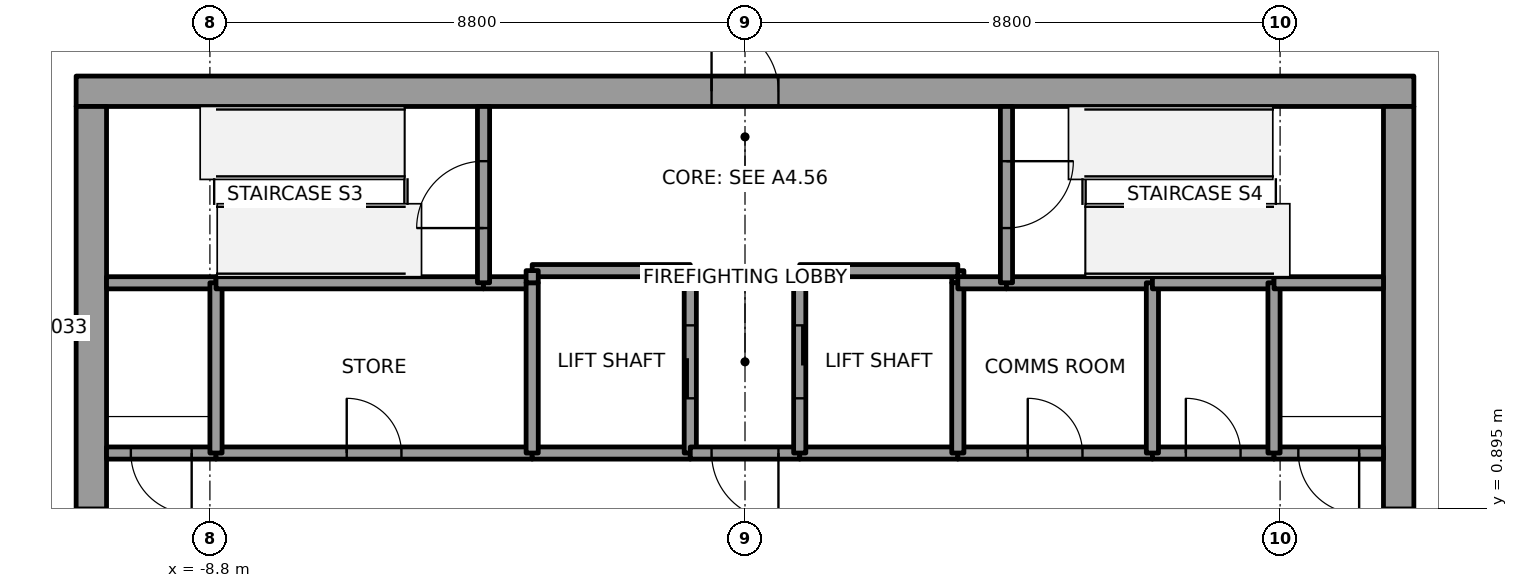
"""IFC4 building model, lengths in metres.
Left out: names, types, materials, properties, quantities, classifications, styles, units other than length and angle.
Written with IfcOpenShell. Run it as: python <this file> out.ifc"""

import sys

from ifc_helpers import new_model, si_unit, direction, frame, frame_2d, origin, place, context, subcontext, project, spatial, rectangle, extrude, element, fill, save


model = new_model("IFC4")
c1 = context("Model", 3, precision=1e-05, world=origin(), true_north=direction((0.0, 1.0)))
c2 = subcontext(c1, "Body", "Model", "MODEL_VIEW")
j1 = project(units=[si_unit("LENGTHUNIT", "METRE"), si_unit("PLANEANGLEUNIT", "RADIAN")], contexts=[c1])
p1 = place(None, origin())
s1 = spatial("IfcSite", under=j1, at=p1, CompositionType="ELEMENT")
p2 = place(p1, origin())
s2 = spatial("IfcBuilding", under=s1, at=p2, CompositionType="ELEMENT")
p3 = place(p2, frame((0.0, 0.0, 243.0)))
s3 = spatial("IfcBuildingStorey", under=s2, at=p3, CompositionType="ELEMENT", Elevation=243.0)
p4 = place(p3, frame((-11.0, 7.75, 0.0), z_axis=(0.0, 0.0, 1.0), x_axis=(1.0, 0.0, 0.0)))
e1 = element("IfcWall", 1, at=p4, inside=s3, PredefinedType="SHEAR", context=c2, shape_type="SweptSolid", body=[
    extrude(rectangle(XDim=22.0, YDim=0.5, at=frame_2d((11.0, 0.0))), origin(), (0.0, 0.0, 1.0), 4.0),
])
p5 = place(p4, frame((10.45, 0.0, 0.0)))
e2 = element("IfcOpeningElement", 2, at=p5, cuts=e1, PredefinedType="OPENING", context=c2, shape_type="SweptSolid", body=[
    extrude(rectangle(XDim=1.1, YDim=2.1, at=frame_2d((0.55, 1.05))), frame((0.0, 0.25, 0.0), z_axis=(0.0, -1.0, 0.0), x_axis=(1.0, 0.0, 0.0)), (0.0, 0.0, 1.0), 0.5),
])
p6 = place(p3, frame((-10.75, -7.5, 0.0), z_axis=(0.0, 0.0, 1.0), x_axis=(0.0, 1.0, 0.0)))
e3 = element("IfcWall", 3, at=p6, inside=s3, PredefinedType="SHEAR", context=c2, shape_type="SweptSolid", body=[
    extrude(rectangle(XDim=15.0, YDim=0.5, at=frame_2d((7.5, 0.0))), origin(), (0.0, 0.0, 1.0), 4.0),
])
p7 = place(p6, frame((6.6, 0.0, 0.0)))
e4 = element("IfcOpeningElement", 4, at=p7, cuts=e3, PredefinedType="OPENING", context=c2, shape_type="SweptSolid", body=[
    extrude(rectangle(XDim=1.8, YDim=2.1, at=frame_2d((0.9, 1.05))), frame((0.0, 0.25, 0.0), z_axis=(0.0, -1.0, 0.0), x_axis=(1.0, 0.0, 0.0)), (0.0, 0.0, 1.0), 0.5),
])
p8 = place(p3, frame((10.75, -7.5, 0.0), z_axis=(0.0, 0.0, 1.0), x_axis=(0.0, 1.0, 0.0)))
e5 = element("IfcWall", 5, at=p8, inside=s3, PredefinedType="SHEAR", context=c2, shape_type="SweptSolid", body=[
    extrude(rectangle(XDim=15.0, YDim=0.5, at=frame_2d((7.5, 0.0))), origin(), (0.0, 0.0, 1.0), 4.0),
])
p9 = place(p8, frame((6.6, 0.0, 0.0)))
e6 = element("IfcOpeningElement", 6, at=p9, cuts=e5, PredefinedType="OPENING", context=c2, shape_type="SweptSolid", body=[
    extrude(rectangle(XDim=1.8, YDim=2.1, at=frame_2d((0.9, 1.05))), frame((0.0, 0.25, 0.0), z_axis=(0.0, -1.0, 0.0), x_axis=(1.0, 0.0, 0.0)), (0.0, 0.0, 1.0), 0.5),
])
p10 = place(p3, frame((-8.7, 1.8, 0.0), z_axis=(0.0, 0.0, 1.0), x_axis=(-1.0, 0.0, 0.0)))
e7 = element("IfcWall", 7, at=p10, inside=s3, PredefinedType="SOLIDWALL", context=c2, shape_type="SweptSolid", body=[
    extrude(rectangle(XDim=1.8, YDim=0.2, at=frame_2d((0.9, 0.0))), origin(), (0.0, 0.0, 1.0), 3.85),
])
p11 = place(p10, frame((0.4, 0.0, 0.0)))
e8 = element("IfcOpeningElement", 8, at=p11, cuts=e7, PredefinedType="OPENING", context=c2, shape_type="SweptSolid", body=[
    extrude(rectangle(XDim=1.0, YDim=2.1, at=frame_2d((0.5, 1.05))), frame((0.0, 0.1, 0.0), z_axis=(0.0, -1.0, 0.0), x_axis=(1.0, 0.0, 0.0)), (0.0, 0.0, 1.0), 0.2),
])
p12 = place(p3, frame((-8.7, 4.6, 0.0), z_axis=(0.0, 0.0, 1.0), x_axis=(-1.0, 0.0, 0.0)))
e9 = element("IfcWall", 9, at=p12, inside=s3, PredefinedType="SOLIDWALL", context=c2, shape_type="SweptSolid", body=[
    extrude(rectangle(XDim=1.8, YDim=0.2, at=frame_2d((0.9, 0.0))), origin(), (0.0, 0.0, 1.0), 3.85),
])
p13 = place(p3, frame((-8.7, 1.8, 0.0), z_axis=(0.0, 0.0, 1.0), x_axis=(1.0, 0.0, 0.0)))
e10 = element("IfcWall", 10, at=p13, inside=s3, PredefinedType="SOLIDWALL", context=c2, shape_type="SweptSolid", body=[
    extrude(rectangle(XDim=5.2, YDim=0.2, at=frame_2d((2.6, 0.0))), origin(), (0.0, 0.0, 1.0), 3.85),
])
p14 = place(p13, frame((2.15, 0.0, 0.0)))
e11 = element("IfcOpeningElement", 11, at=p14, cuts=e10, PredefinedType="OPENING", context=c2, shape_type="SweptSolid", body=[
    extrude(rectangle(XDim=0.9, YDim=2.1, at=frame_2d((0.45, 1.05))), frame((0.0, 0.1, 0.0), z_axis=(0.0, -1.0, 0.0), x_axis=(1.0, 0.0, 0.0)), (0.0, 0.0, 1.0), 0.2),
])
p15 = place(p3, frame((-8.7, 4.6, 0.0), z_axis=(0.0, 0.0, 1.0), x_axis=(0.0, -1.0, 0.0)))
e12 = element("IfcWall", 12, at=p15, inside=s3, PredefinedType="SOLIDWALL", context=c2, shape_type="SweptSolid", body=[
    extrude(rectangle(XDim=2.8, YDim=0.2, at=frame_2d((1.4, 0.0))), origin(), (0.0, 0.0, 1.0), 3.85),
])
p16 = place(p3, frame((-4.3, 4.6, 0.0), z_axis=(0.0, 0.0, 1.0), x_axis=(-1.0, 0.0, 0.0)))
e13 = element("IfcWall", 13, at=p16, inside=s3, PredefinedType="SOLIDWALL", context=c2, shape_type="SweptSolid", body=[
    extrude(rectangle(XDim=4.4, YDim=0.2, at=frame_2d((2.2, 0.0))), origin(), (0.0, 0.0, 1.0), 3.85),
])
p17 = place(p3, frame((-3.5, 4.6, 0.0), z_axis=(0.0, 0.0, 1.0), x_axis=(-1.0, 0.0, 0.0)))
e14 = element("IfcWall", 14, at=p17, inside=s3, PredefinedType="SOLIDWALL", context=c2, shape_type="SweptSolid", body=[
    extrude(rectangle(XDim=0.8, YDim=0.2, at=frame_2d((0.4, 0.0))), origin(), (0.0, 0.0, 1.0), 3.85),
])
p18 = place(p3, frame((-4.3, 4.6, 0.0), z_axis=(0.0, 0.0, 1.0), x_axis=(0.0, 1.0, 0.0)))
e15 = element("IfcWall", 15, at=p18, inside=s3, PredefinedType="SOLIDWALL", context=c2, shape_type="SweptSolid", body=[
    extrude(rectangle(XDim=2.9, YDim=0.2, at=frame_2d((1.45, 0.0))), origin(), (0.0, 0.0, 1.0), 3.85),
])
p19 = place(p18, frame((0.9, 0.0, 0.0)))
e16 = element("IfcOpeningElement", 16, at=p19, cuts=e15, PredefinedType="OPENING", context=c2, shape_type="SweptSolid", body=[
    extrude(rectangle(XDim=1.1, YDim=2.1, at=frame_2d((0.55, 1.05))), frame((0.0, 0.1, 0.0), z_axis=(0.0, -1.0, 0.0), x_axis=(1.0, 0.0, 0.0)), (0.0, 0.0, 1.0), 0.2),
])
p20 = place(p3, frame((-0.9, 1.8, 0.0), z_axis=(0.0, 0.0, 1.0), x_axis=(-1.0, 0.0, 0.0)))
e17 = element("IfcWall", 17, at=p20, inside=s3, PredefinedType="SOLIDWALL", context=c2, shape_type="SweptSolid", body=[
    extrude(rectangle(XDim=2.6, YDim=0.2, at=frame_2d((1.3, 0.0))), origin(), (0.0, 0.0, 1.0), 3.85),
])
p21 = place(p3, frame((-3.5, 1.8, 0.0), z_axis=(0.0, 0.0, 1.0), x_axis=(0.0, 1.0, 0.0)))
e18 = element("IfcWall", 18, at=p21, inside=s3, PredefinedType="SOLIDWALL", context=c2, shape_type="SweptSolid", body=[
    extrude(rectangle(XDim=2.8, YDim=0.2, at=frame_2d((1.4, 0.0))), origin(), (0.0, 0.0, 1.0), 3.85),
])
p22 = place(p3, frame((-0.9, 1.8, 0.0), z_axis=(0.0, 0.0, 1.0), x_axis=(0.0, 1.0, 0.0)))
e19 = element("IfcWall", 19, at=p22, inside=s3, PredefinedType="SOLIDWALL", context=c2, shape_type="SweptSolid", body=[
    extrude(rectangle(XDim=3.0, YDim=0.2, at=frame_2d((1.5, 0.0))), origin(), (0.0, 0.0, 1.0), 3.85),
])
p23 = place(p22, frame((0.9, 0.0, 0.0)))
e20 = element("IfcOpeningElement", 20, at=p23, cuts=e19, PredefinedType="OPENING", context=c2, shape_type="SweptSolid", body=[
    extrude(rectangle(XDim=1.2, YDim=2.1, at=frame_2d((0.6, 1.05))), frame((0.0, 0.1, 0.0), z_axis=(0.0, -1.0, 0.0), x_axis=(1.0, 0.0, 0.0)), (0.0, 0.0, 1.0), 0.2),
])
p24 = place(p3, frame((-0.9, 4.8, 0.0), z_axis=(0.0, 0.0, 1.0), x_axis=(-1.0, 0.0, 0.0)))
e21 = element("IfcWall", 21, at=p24, inside=s3, PredefinedType="SOLIDWALL", context=c2, shape_type="SweptSolid", body=[
    extrude(rectangle(XDim=2.6, YDim=0.2, at=frame_2d((1.3, 0.0))), origin(), (0.0, 0.0, 1.0), 3.85),
])
p25 = place(p3, frame((-3.5, 4.8, 0.0), z_axis=(0.0, 0.0, 1.0), x_axis=(0.0, -1.0, 0.0)))
e22 = element("IfcWall", 22, at=p25, inside=s3, PredefinedType="SOLIDWALL", context=c2, shape_type="SweptSolid", body=[
    extrude(rectangle(XDim=0.2, YDim=0.2, at=frame_2d((0.1, 0.0))), origin(), (0.0, 0.0, 1.0), 3.85),
])
p26 = place(p3, frame((0.9, 1.8, 0.0), z_axis=(0.0, 0.0, 1.0), x_axis=(-1.0, 0.0, 0.0)))
e23 = element("IfcWall", 23, at=p26, inside=s3, PredefinedType="SOLIDWALL", context=c2, shape_type="SweptSolid", body=[
    extrude(rectangle(XDim=1.8, YDim=0.2, at=frame_2d((0.9, 0.0))), origin(), (0.0, 0.0, 1.0), 3.85),
])
p27 = place(p26, frame((0.35, 0.0, 0.0)))
e24 = element("IfcOpeningElement", 24, at=p27, cuts=e23, PredefinedType="OPENING", context=c2, shape_type="SweptSolid", body=[
    extrude(rectangle(XDim=1.1, YDim=2.1, at=frame_2d((0.55, 1.05))), frame((0.0, 0.1, 0.0), z_axis=(0.0, -1.0, 0.0), x_axis=(1.0, 0.0, 0.0)), (0.0, 0.0, 1.0), 0.2),
])
p28 = place(p3, frame((3.5, 1.8, 0.0), z_axis=(0.0, 0.0, 1.0), x_axis=(-1.0, 0.0, 0.0)))
e25 = element("IfcWall", 25, at=p28, inside=s3, PredefinedType="SOLIDWALL", context=c2, shape_type="SweptSolid", body=[
    extrude(rectangle(XDim=2.6, YDim=0.2, at=frame_2d((1.3, 0.0))), origin(), (0.0, 0.0, 1.0), 3.85),
])
p29 = place(p3, frame((3.5, 4.6, 0.0), z_axis=(0.0, 0.0, 1.0), x_axis=(0.0, 1.0, 0.0)))
e26 = element("IfcWall", 26, at=p29, inside=s3, PredefinedType="SOLIDWALL", context=c2, shape_type="SweptSolid", body=[
    extrude(rectangle(XDim=0.2, YDim=0.2, at=frame_2d((0.1, 0.0))), origin(), (0.0, 0.0, 1.0), 3.85),
])
p30 = place(p3, frame((3.5, 4.8, 0.0), z_axis=(0.0, 0.0, 1.0), x_axis=(-1.0, 0.0, 0.0)))
e27 = element("IfcWall", 27, at=p30, inside=s3, PredefinedType="SOLIDWALL", context=c2, shape_type="SweptSolid", body=[
    extrude(rectangle(XDim=2.6, YDim=0.2, at=frame_2d((1.3, 0.0))), origin(), (0.0, 0.0, 1.0), 3.85),
])
p31 = place(p3, frame((0.9, 4.8, 0.0), z_axis=(0.0, 0.0, 1.0), x_axis=(0.0, -1.0, 0.0)))
e28 = element("IfcWall", 28, at=p31, inside=s3, PredefinedType="SOLIDWALL", context=c2, shape_type="SweptSolid", body=[
    extrude(rectangle(XDim=3.0, YDim=0.2, at=frame_2d((1.5, 0.0))), origin(), (0.0, 0.0, 1.0), 3.85),
])
p32 = place(p31, frame((0.9, 0.0, 0.0)))
e29 = element("IfcOpeningElement", 29, at=p32, cuts=e28, PredefinedType="OPENING", context=c2, shape_type="SweptSolid", body=[
    extrude(rectangle(XDim=1.2, YDim=2.1, at=frame_2d((0.6, 1.05))), frame((0.0, 0.1, 0.0), z_axis=(0.0, -1.0, 0.0), x_axis=(1.0, 0.0, 0.0)), (0.0, 0.0, 1.0), 0.2),
])
p33 = place(p3, frame((3.5, 1.8, 0.0), z_axis=(0.0, 0.0, 1.0), x_axis=(1.0, 0.0, 0.0)))
e30 = element("IfcWall", 30, at=p33, inside=s3, PredefinedType="SOLIDWALL", context=c2, shape_type="SweptSolid", body=[
    extrude(rectangle(XDim=3.2, YDim=0.2, at=frame_2d((1.6, 0.0))), origin(), (0.0, 0.0, 1.0), 3.85),
])
p34 = place(p33, frame((1.15, 0.0, 0.0)))
e31 = element("IfcOpeningElement", 31, at=p34, cuts=e30, PredefinedType="OPENING", context=c2, shape_type="SweptSolid", body=[
    extrude(rectangle(XDim=0.9, YDim=2.1, at=frame_2d((0.45, 1.05))), frame((0.0, 0.1, 0.0), z_axis=(0.0, -1.0, 0.0), x_axis=(1.0, 0.0, 0.0)), (0.0, 0.0, 1.0), 0.2),
])
p35 = place(p3, frame((3.5, 4.6, 0.0), z_axis=(0.0, 0.0, 1.0), x_axis=(0.0, -1.0, 0.0)))
e32 = element("IfcWall", 32, at=p35, inside=s3, PredefinedType="SOLIDWALL", context=c2, shape_type="SweptSolid", body=[
    extrude(rectangle(XDim=2.8, YDim=0.2, at=frame_2d((1.4, 0.0))), origin(), (0.0, 0.0, 1.0), 3.85),
])
p36 = place(p3, frame((4.3, 4.6, 0.0), z_axis=(0.0, 0.0, 1.0), x_axis=(-1.0, 0.0, 0.0)))
e33 = element("IfcWall", 33, at=p36, inside=s3, PredefinedType="SOLIDWALL", context=c2, shape_type="SweptSolid", body=[
    extrude(rectangle(XDim=0.8, YDim=0.2, at=frame_2d((0.4, 0.0))), origin(), (0.0, 0.0, 1.0), 3.85),
])
p37 = place(p3, frame((6.7, 4.6, 0.0), z_axis=(0.0, 0.0, 1.0), x_axis=(-1.0, 0.0, 0.0)))
e34 = element("IfcWall", 34, at=p37, inside=s3, PredefinedType="SOLIDWALL", context=c2, shape_type="SweptSolid", body=[
    extrude(rectangle(XDim=2.4, YDim=0.2, at=frame_2d((1.2, 0.0))), origin(), (0.0, 0.0, 1.0), 3.85),
])
p38 = place(p3, frame((4.3, 7.5, 0.0), z_axis=(0.0, 0.0, 1.0), x_axis=(0.0, -1.0, 0.0)))
e35 = element("IfcWall", 35, at=p38, inside=s3, PredefinedType="SOLIDWALL", context=c2, shape_type="SweptSolid", body=[
    extrude(rectangle(XDim=2.9, YDim=0.2, at=frame_2d((1.45, 0.0))), origin(), (0.0, 0.0, 1.0), 3.85),
])
p39 = place(p38, frame((0.9, 0.0, 0.0)))
e36 = element("IfcOpeningElement", 36, at=p39, cuts=e35, PredefinedType="OPENING", context=c2, shape_type="SweptSolid", body=[
    extrude(rectangle(XDim=1.1, YDim=2.1, at=frame_2d((0.55, 1.05))), frame((0.0, 0.1, 0.0), z_axis=(0.0, -1.0, 0.0), x_axis=(1.0, 0.0, 0.0)), (0.0, 0.0, 1.0), 0.2),
])
p40 = place(p3, frame((6.7, 1.8, 0.0), z_axis=(0.0, 0.0, 1.0), x_axis=(1.0, 0.0, 0.0)))
e37 = element("IfcWall", 37, at=p40, inside=s3, PredefinedType="SOLIDWALL", context=c2, shape_type="SweptSolid", body=[
    extrude(rectangle(XDim=2.0, YDim=0.2, at=frame_2d((1.0, 0.0))), origin(), (0.0, 0.0, 1.0), 3.85),
])
p41 = place(p40, frame((0.55, 0.0, 0.0)))
e38 = element("IfcOpeningElement", 38, at=p41, cuts=e37, PredefinedType="OPENING", context=c2, shape_type="SweptSolid", body=[
    extrude(rectangle(XDim=0.9, YDim=2.1, at=frame_2d((0.45, 1.05))), frame((0.0, 0.1, 0.0), z_axis=(0.0, -1.0, 0.0), x_axis=(1.0, 0.0, 0.0)), (0.0, 0.0, 1.0), 0.2),
])
p42 = place(p3, frame((6.7, 1.8, 0.0), z_axis=(0.0, 0.0, 1.0), x_axis=(0.0, 1.0, 0.0)))
e39 = element("IfcWall", 39, at=p42, inside=s3, PredefinedType="SOLIDWALL", context=c2, shape_type="SweptSolid", body=[
    extrude(rectangle(XDim=2.8, YDim=0.2, at=frame_2d((1.4, 0.0))), origin(), (0.0, 0.0, 1.0), 3.85),
])
p43 = place(p3, frame((8.7, 4.6, 0.0), z_axis=(0.0, 0.0, 1.0), x_axis=(-1.0, 0.0, 0.0)))
e40 = element("IfcWall", 40, at=p43, inside=s3, PredefinedType="SOLIDWALL", context=c2, shape_type="SweptSolid", body=[
    extrude(rectangle(XDim=2.0, YDim=0.2, at=frame_2d((1.0, 0.0))), origin(), (0.0, 0.0, 1.0), 3.85),
])
p44 = place(p3, frame((10.5, 1.8, 0.0), z_axis=(0.0, 0.0, 1.0), x_axis=(-1.0, 0.0, 0.0)))
e41 = element("IfcWall", 41, at=p44, inside=s3, PredefinedType="SOLIDWALL", context=c2, shape_type="SweptSolid", body=[
    extrude(rectangle(XDim=1.8, YDim=0.2, at=frame_2d((0.9, 0.0))), origin(), (0.0, 0.0, 1.0), 3.85),
])
p45 = place(p44, frame((0.4, 0.0, 0.0)))
e42 = element("IfcOpeningElement", 42, at=p45, cuts=e41, PredefinedType="OPENING", context=c2, shape_type="SweptSolid", body=[
    extrude(rectangle(XDim=1.0, YDim=2.1, at=frame_2d((0.5, 1.05))), frame((0.0, 0.1, 0.0), z_axis=(0.0, -1.0, 0.0), x_axis=(1.0, 0.0, 0.0)), (0.0, 0.0, 1.0), 0.2),
])
p46 = place(p3, frame((8.7, 1.8, 0.0), z_axis=(0.0, 0.0, 1.0), x_axis=(0.0, 1.0, 0.0)))
e43 = element("IfcWall", 43, at=p46, inside=s3, PredefinedType="SOLIDWALL", context=c2, shape_type="SweptSolid", body=[
    extrude(rectangle(XDim=2.8, YDim=0.2, at=frame_2d((1.4, 0.0))), origin(), (0.0, 0.0, 1.0), 3.85),
])
p47 = place(p3, frame((10.5, 4.6, 0.0), z_axis=(0.0, 0.0, 1.0), x_axis=(-1.0, 0.0, 0.0)))
e44 = element("IfcWall", 44, at=p47, inside=s3, PredefinedType="SOLIDWALL", context=c2, shape_type="SweptSolid", body=[
    extrude(rectangle(XDim=1.8, YDim=0.2, at=frame_2d((0.9, 0.0))), origin(), (0.0, 0.0, 1.0), 3.85),
])
p48 = place(p23, origin())
e45 = element("IfcDoor", 45, at=p48, inside=s3, OperationType="SLIDING_TO_LEFT", PredefinedType="DOOR", context=c2, shape_type="SweptSolid", body=[
    extrude(rectangle(XDim=1.2, YDim=2.1, at=frame_2d((0.6, 1.05))), frame((0.0, 0.025, 0.0), z_axis=(0.0, -1.0, 0.0), x_axis=(1.0, 0.0, 0.0)), (0.0, 0.0, 1.0), 0.05),
])
fill(e20, e45)
p49 = place(p32, origin())
e46 = element("IfcDoor", 46, at=p49, inside=s3, OperationType="SLIDING_TO_RIGHT", PredefinedType="DOOR", context=c2, shape_type="SweptSolid", body=[
    extrude(rectangle(XDim=1.2, YDim=2.1, at=frame_2d((0.6, 1.05))), frame((0.0, 0.025, 0.0), z_axis=(0.0, -1.0, 0.0), x_axis=(1.0, 0.0, 0.0)), (0.0, 0.0, 1.0), 0.05),
])
fill(e29, e46)
p50 = place(p27, origin())
e47 = element("IfcDoor", 47, at=p50, inside=s3, OperationType="SINGLE_SWING_RIGHT", PredefinedType="DOOR", context=c2, shape_type="SweptSolid", body=[
    extrude(rectangle(XDim=1.1, YDim=2.1, at=frame_2d((0.55, 1.05))), frame((0.0, 0.025, 0.0), z_axis=(0.0, -1.0, 0.0), x_axis=(1.0, 0.0, 0.0)), (0.0, 0.0, 1.0), 0.05),
])
fill(e24, e47)
p51 = place(p11, origin())
e48 = element("IfcDoor", 48, at=p51, inside=s3, OperationType="SINGLE_SWING_LEFT", PredefinedType="DOOR", context=c2, shape_type="SweptSolid", body=[
    extrude(rectangle(XDim=1.0, YDim=2.1, at=frame_2d((0.5, 1.05))), frame((0.0, 0.025, 0.0), z_axis=(0.0, -1.0, 0.0), x_axis=(1.0, 0.0, 0.0)), (0.0, 0.0, 1.0), 0.05),
])
fill(e8, e48)
p52 = place(p45, origin())
e49 = element("IfcDoor", 49, at=p52, inside=s3, OperationType="SINGLE_SWING_RIGHT", PredefinedType="DOOR", context=c2, shape_type="SweptSolid", body=[
    extrude(rectangle(XDim=1.0, YDim=2.1, at=frame_2d((0.5, 1.05))), frame((0.0, 0.025, 0.0), z_axis=(0.0, -1.0, 0.0), x_axis=(1.0, 0.0, 0.0)), (0.0, 0.0, 1.0), 0.05),
])
fill(e42, e49)
p53 = place(p19, origin())
e50 = element("IfcDoor", 50, at=p53, inside=s3, OperationType="SINGLE_SWING_LEFT", PredefinedType="DOOR", context=c2, shape_type="SweptSolid", body=[
    extrude(rectangle(XDim=1.1, YDim=2.1, at=frame_2d((0.55, 1.05))), frame((0.0, 0.025, 0.0), z_axis=(0.0, -1.0, 0.0), x_axis=(1.0, 0.0, 0.0)), (0.0, 0.0, 1.0), 0.05),
])
fill(e16, e50)
p54 = place(p39, origin())
e51 = element("IfcDoor", 51, at=p54, inside=s3, OperationType="SINGLE_SWING_RIGHT", PredefinedType="DOOR", context=c2, shape_type="SweptSolid", body=[
    extrude(rectangle(XDim=1.1, YDim=2.1, at=frame_2d((0.55, 1.05))), frame((0.0, 0.025, 0.0), z_axis=(0.0, -1.0, 0.0), x_axis=(1.0, 0.0, 0.0)), (0.0, 0.0, 1.0), 0.05),
])
fill(e36, e51)
p55 = place(p34, origin())
e52 = element("IfcDoor", 52, at=p55, inside=s3, OperationType="SINGLE_SWING_RIGHT", PredefinedType="DOOR", context=c2, shape_type="SweptSolid", body=[
    extrude(rectangle(XDim=0.9, YDim=2.1, at=frame_2d((0.45, 1.05))), frame((0.0, 0.025, 0.0), z_axis=(0.0, -1.0, 0.0), x_axis=(1.0, 0.0, 0.0)), (0.0, 0.0, 1.0), 0.05),
])
fill(e31, e52)
p56 = place(p41, origin())
e53 = element("IfcDoor", 53, at=p56, inside=s3, OperationType="SINGLE_SWING_RIGHT", PredefinedType="DOOR", context=c2, shape_type="SweptSolid", body=[
    extrude(rectangle(XDim=0.9, YDim=2.1, at=frame_2d((0.45, 1.05))), frame((0.0, 0.025, 0.0), z_axis=(0.0, -1.0, 0.0), x_axis=(1.0, 0.0, 0.0)), (0.0, 0.0, 1.0), 0.05),
])
fill(e38, e53)
p57 = place(p14, origin())
e54 = element("IfcDoor", 54, at=p57, inside=s3, OperationType="SINGLE_SWING_RIGHT", PredefinedType="DOOR", context=c2, shape_type="SweptSolid", body=[
    extrude(rectangle(XDim=0.9, YDim=2.1, at=frame_2d((0.45, 1.05))), frame((0.0, 0.025, 0.0), z_axis=(0.0, -1.0, 0.0), x_axis=(1.0, 0.0, 0.0)), (0.0, 0.0, 1.0), 0.05),
])
fill(e11, e54)
p58 = place(p7, origin())
e55 = element("IfcDoor", 55, at=p58, inside=s3, OperationType="DOUBLE_DOOR_SINGLE_SWING", PredefinedType="DOOR", context=c2, shape_type="SweptSolid", body=[
    extrude(rectangle(XDim=1.8, YDim=2.1, at=frame_2d((0.9, 1.05))), frame((0.0, 0.025, 0.0), z_axis=(0.0, -1.0, 0.0), x_axis=(1.0, 0.0, 0.0)), (0.0, 0.0, 1.0), 0.05),
])
fill(e4, e55)
p59 = place(p9, origin())
e56 = element("IfcDoor", 56, at=p59, inside=s3, OperationType="DOUBLE_DOOR_SINGLE_SWING", PredefinedType="DOOR", context=c2, shape_type="SweptSolid", body=[
    extrude(rectangle(XDim=1.8, YDim=2.1, at=frame_2d((0.9, 1.05))), frame((0.0, 0.025, 0.0), z_axis=(0.0, -1.0, 0.0), x_axis=(1.0, 0.0, 0.0)), (0.0, 0.0, 1.0), 0.05),
])
fill(e6, e56)
p60 = place(p5, origin())
e57 = element("IfcDoor", 57, at=p60, inside=s3, OperationType="SINGLE_SWING_RIGHT", PredefinedType="DOOR", context=c2, shape_type="SweptSolid", body=[
    extrude(rectangle(XDim=1.1, YDim=2.1, at=frame_2d((0.55, 1.05))), frame((0.0, 0.025, 0.0), z_axis=(0.0, -1.0, 0.0), x_axis=(1.0, 0.0, 0.0)), (0.0, 0.0, 1.0), 0.05),
])
fill(e2, e57)
save(model, sys.argv[1])
